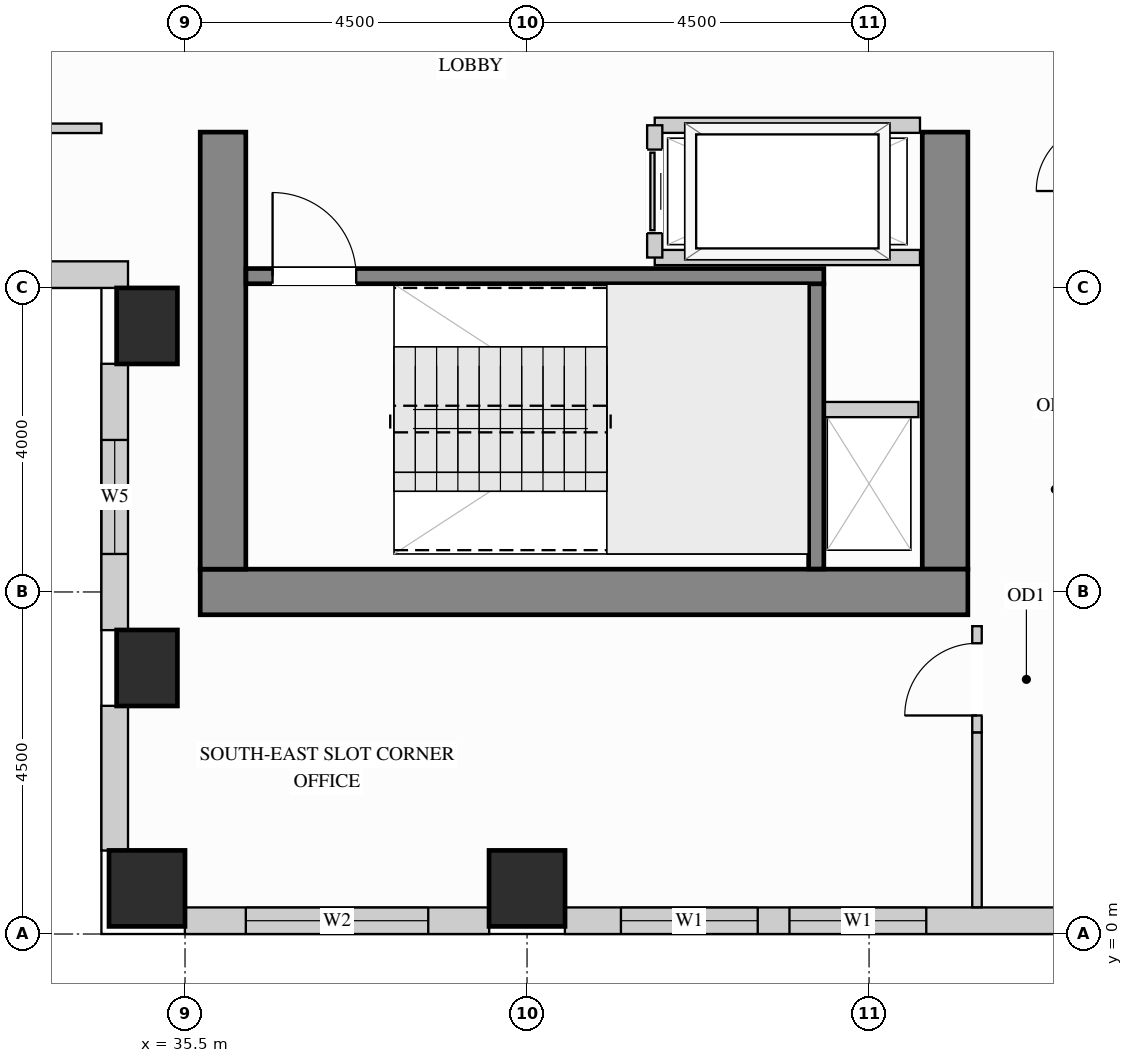
"""IFC4 building model, lengths in metres.
Left out: names, types, materials, properties, quantities, classifications, styles, units other than length and angle.
Written with IfcOpenShell. Run it as: python <this file> out.ifc"""

import sys

from ifc_helpers import new_model, si_unit, direction, frame, frame_2d, origin, origin_2d, place, context, subcontext, project, spatial, rectangle, extrude, source, transform, mapped, element, fill, save


model = new_model("IFC4")
c1 = context("Model", 3, precision=1e-05, world=origin(), true_north=direction((0.0, 1.0)))
c2 = subcontext(c1, "Body", "Model", "MODEL_VIEW")
j1 = project(units=[si_unit("LENGTHUNIT", "METRE"), si_unit("PLANEANGLEUNIT", "RADIAN")], contexts=[c1])
p1 = place(None, origin())
s1 = spatial("IfcSite", under=j1, at=p1, CompositionType="ELEMENT")
p2 = place(p1, origin())
s2 = spatial("IfcBuilding", under=s1, at=p2, CompositionType="ELEMENT")
p3 = place(p2, frame((0.0, 0.0, 168.3)))
s3 = spatial("IfcBuildingStorey", under=s2, at=p3, CompositionType="ELEMENT", Elevation=168.3)
m1 = source(origin(), c2, "Body", "SweptSolid", [
    extrude(rectangle(XDim=0.8, YDim=1.0, at=origin_2d()), origin(), (0.0, 0.0, 1.0), 3.4),
])
for number, where, z_axis, x_axis in (
    (1, (35.0, 3.5, 0.0), (0.0, 0.0, 1.0), (1.0, 0.0, 0.0)),
    (2, (35.0, 8.0, 0.0), (0.0, 0.0, 1.0), (1.0, 0.0, 0.0)),
):
    element("IfcColumn", number, at=place(p3, frame(where, z_axis=z_axis, x_axis=x_axis)), inside=s3, PredefinedType="COLUMN", context=c2, shape_type="MappedRepresentation", body=[
        mapped(m1, transform((0.0, 0.0, 0.0), x_axis=(1.0, 0.0, 0.0), y_axis=(0.0, 1.0, 0.0), z_axis=(0.0, 0.0, 1.0))),
    ])
m2 = source(origin(), c2, "Body", "SweptSolid", [
    extrude(rectangle(XDim=1.0, YDim=1.0, at=origin_2d()), origin(), (0.0, 0.0, 1.0), 3.4),
])
for number, where, z_axis, x_axis in (
    (3, (35.0, 0.6, 0.0), (0.0, 0.0, 1.0), (1.0, 0.0, 0.0)),
    (4, (40.0, 0.6, 0.0), (0.0, 0.0, 1.0), (1.0, 0.0, 0.0)),
):
    element("IfcColumn", number, at=place(p3, frame(where, z_axis=z_axis, x_axis=x_axis)), inside=s3, PredefinedType="COLUMN", context=c2, shape_type="MappedRepresentation", body=[
        mapped(m2, transform((0.0, 0.0, 0.0), x_axis=(1.0, 0.0, 0.0), y_axis=(0.0, 1.0, 0.0), z_axis=(0.0, 0.0, 1.0))),
    ])
m3 = source(origin(), c2, "Body", "SweptSolid", [
    extrude(rectangle(XDim=5.75, YDim=0.6, at=frame_2d((2.875, 0.0))), origin(), (0.0, 0.0, 1.0), 3.4),
])
p4 = place(p3, frame((45.5, 4.8, 0.0), z_axis=(0.0, 0.0, 1.0), x_axis=(0.0, 1.0, 0.0)))
e5 = element("IfcWall", 5, at=p4, inside=s3, PredefinedType="SHEAR", context=c2, shape_type="MappedRepresentation", body=[
    mapped(m3, transform((0.0, 0.0, 0.0), x_axis=(1.0, 0.0, 0.0), y_axis=(0.0, 1.0, 0.0), z_axis=(0.0, 0.0, 1.0))),
])
m4 = source(origin(), c2, "Body", "SweptSolid", [
    extrude(rectangle(XDim=10.1, YDim=0.6, at=frame_2d((5.05, 0.0))), origin(), (0.0, 0.0, 1.0), 3.4),
])
p5 = place(p3, frame((35.7, 4.5, 0.0), z_axis=(0.0, 0.0, 1.0), x_axis=(1.0, 0.0, 0.0)))
e6 = element("IfcWall", 6, at=p5, inside=s3, PredefinedType="SHEAR", context=c2, shape_type="MappedRepresentation", body=[
    mapped(m4, transform((0.0, 0.0, 0.0), x_axis=(1.0, 0.0, 0.0), y_axis=(0.0, 1.0, 0.0), z_axis=(0.0, 0.0, 1.0))),
])
p6 = place(p3, frame((36.0, 4.8, 0.0), z_axis=(0.0, 0.0, 1.0), x_axis=(0.0, 1.0, 0.0)))
e7 = element("IfcWall", 7, at=p6, inside=s3, PredefinedType="SHEAR", context=c2, shape_type="MappedRepresentation", body=[
    mapped(m3, transform((0.0, 0.0, 0.0), x_axis=(1.0, 0.0, 0.0), y_axis=(0.0, 1.0, 0.0), z_axis=(0.0, 0.0, 1.0))),
])
p7 = place(p3, frame((30.898, 8.675, 0.0), z_axis=(0.0, 0.0, 1.0), x_axis=(1.0, 0.0, 0.0)))
e8 = element("IfcWall", 8, at=p7, inside=s3, PredefinedType="SOLIDWALL", context=c2, shape_type="SweptSolid", body=[
    extrude(rectangle(XDim=3.852, YDim=0.35, at=frame_2d((1.926, 0.0))), origin(), (0.0, 0.0, 1.0), 3.385),
])
p8 = place(p7, frame((1.176, 0.0, 0.78)))
e9 = element("IfcOpeningElement", 9, at=p8, cuts=e8, PredefinedType="OPENING", context=c2, shape_type="SweptSolid", body=[
    extrude(rectangle(XDim=1.5, YDim=2.0, at=frame_2d((0.75, 1.0))), frame((0.0, 0.185, 0.0), z_axis=(0.0, -1.0, 0.0), x_axis=(1.0, 0.0, 0.0)), (0.0, 0.0, 1.0), 0.37),
])
p9 = place(p3, frame((34.575, 7.502, 0.0), z_axis=(0.0, 0.0, 1.0), x_axis=(0.0, -1.0, 0.0)))
e10 = element("IfcWall", 10, at=p9, inside=s3, PredefinedType="SOLIDWALL", context=c2, shape_type="SweptSolid", body=[
    extrude(rectangle(XDim=3.504, YDim=0.35, at=frame_2d((1.752, 0.0))), origin(), (0.0, 0.0, 1.0), 2.612),
])
p10 = place(p9, frame((1.002, 0.0, 0.78)))
e11 = element("IfcOpeningElement", 11, at=p10, cuts=e10, PredefinedType="OPENING", context=c2, shape_type="SweptSolid", body=[
    extrude(rectangle(XDim=1.5, YDim=1.652, at=frame_2d((0.75, 0.826))), frame((0.0, 0.185, 0.0), z_axis=(0.0, -1.0, 0.0), x_axis=(1.0, 0.0, 0.0)), (0.0, 0.0, 1.0), 0.37),
])
m5 = source(origin(), c2, "Body", "SweptSolid", [
    extrude(rectangle(XDim=1.904, YDim=0.35, at=frame_2d((0.952, 0.0))), origin(), (0.0, 0.0, 1.0), 2.612),
])
p11 = place(p3, frame((34.575, 3.002, 0.0), z_axis=(0.0, 0.0, 1.0), x_axis=(0.0, -1.0, 0.0)))
e12 = element("IfcWall", 12, at=p11, inside=s3, PredefinedType="SOLIDWALL", context=c2, shape_type="MappedRepresentation", body=[
    mapped(m5, transform((0.0, 0.0, 0.0), x_axis=(1.0, 0.0, 0.0), y_axis=(0.0, 1.0, 0.0), z_axis=(0.0, 0.0, 1.0))),
])
p12 = place(p3, frame((35.498, 0.175, 0.0), z_axis=(0.0, 0.0, 1.0), x_axis=(1.0, 0.0, 0.0)))
e13 = element("IfcWall", 13, at=p12, inside=s3, PredefinedType="SOLIDWALL", context=c2, shape_type="SweptSolid", body=[
    extrude(rectangle(XDim=4.004, YDim=0.35, at=frame_2d((2.002, 0.0))), origin(), (0.0, 0.0, 1.0), 2.612),
])
p13 = place(p12, frame((0.802, 0.0, 0.78)))
e14 = element("IfcOpeningElement", 14, at=p13, cuts=e13, PredefinedType="OPENING", context=c2, shape_type="SweptSolid", body=[
    extrude(rectangle(XDim=2.4, YDim=1.652, at=frame_2d((1.2, 0.826))), frame((0.0, 0.185, 0.0), z_axis=(0.0, -1.0, 0.0), x_axis=(1.0, 0.0, 0.0)), (0.0, 0.0, 1.0), 0.37),
])
p14 = place(p3, frame((40.498, 0.175, 0.0), z_axis=(0.0, 0.0, 1.0), x_axis=(1.0, 0.0, 0.0)))
e15 = element("IfcWall", 15, at=p14, inside=s3, PredefinedType="SOLIDWALL", context=c2, shape_type="SweptSolid", body=[
    extrude(rectangle(XDim=6.604, YDim=0.35, at=frame_2d((3.302, 0.0))), origin(), (0.0, 0.0, 1.0), 2.612),
])
p15 = place(p14, frame((0.737, 0.0, 0.78)))
e16 = element("IfcOpeningElement", 16, at=p15, cuts=e15, PredefinedType="OPENING", context=c2, shape_type="SweptSolid", body=[
    extrude(rectangle(XDim=1.8, YDim=1.652, at=frame_2d((0.9, 0.826))), frame((0.0, 0.185, 0.0), z_axis=(0.0, -1.0, 0.0), x_axis=(1.0, 0.0, 0.0)), (0.0, 0.0, 1.0), 0.37),
])
p16 = place(p14, frame((2.955, 0.0, 0.78)))
e17 = element("IfcOpeningElement", 17, at=p16, cuts=e15, PredefinedType="OPENING", context=c2, shape_type="SweptSolid", body=[
    extrude(rectangle(XDim=1.8, YDim=1.652, at=frame_2d((0.9, 0.826))), frame((0.0, 0.185, 0.0), z_axis=(0.0, -1.0, 0.0), x_axis=(1.0, 0.0, 0.0)), (0.0, 0.0, 1.0), 0.37),
])
p17 = place(p3, frame((45.92, 2.65, 0.0), z_axis=(0.0, 0.0, 1.0), x_axis=(0.0, 1.0, 0.0)))
e18 = element("IfcWall", 18, at=p17, inside=s3, PredefinedType="PARTITIONING", context=c2, shape_type="SweptSolid", body=[
    extrude(rectangle(XDim=1.4, YDim=0.125, at=frame_2d((0.7, 0.0))), origin(), (0.0, 0.0, 1.0), 3.385),
])
p18 = place(p17, frame((0.225, 0.0, 0.0)))
e19 = element("IfcOpeningElement", 19, at=p18, cuts=e18, PredefinedType="OPENING", context=c2, shape_type="SweptSolid", body=[
    extrude(rectangle(XDim=0.95, YDim=2.15, at=frame_2d((0.475, 1.075))), frame((0.0, 0.073, 0.0), z_axis=(0.0, -1.0, 0.0), x_axis=(1.0, 0.0, 0.0)), (0.0, 0.0, 1.0), 0.145),
])
m6 = source(origin(), c2, "Body", "SweptSolid", [
    extrude(rectangle(XDim=2.298, YDim=0.125, at=frame_2d((1.149, 0.0))), origin(), (0.0, 0.0, 1.0), 3.385),
])
p19 = place(p3, frame((45.92, 0.352, 0.0), z_axis=(0.0, 0.0, 1.0), x_axis=(0.0, 1.0, 0.0)))
e20 = element("IfcWall", 20, at=p19, inside=s3, PredefinedType="PARTITIONING", context=c2, shape_type="MappedRepresentation", body=[
    mapped(m6, transform((0.0, 0.0, 0.0), x_axis=(1.0, 0.0, 0.0), y_axis=(0.0, 1.0, 0.0), z_axis=(0.0, 0.0, 1.0))),
])
p20 = place(p3, frame((19.5, 10.6, 0.0), z_axis=(0.0, 0.0, 1.0), x_axis=(1.0, 0.0, 0.0)))
e21 = element("IfcWall", 21, at=p20, inside=s3, PredefinedType="PARTITIONING", context=c2, shape_type="SweptSolid", body=[
    extrude(rectangle(XDim=14.9, YDim=0.125, at=frame_2d((7.45, 0.0))), origin(), (0.0, 0.0, 1.0), 3.385),
])
p21 = place(p20, frame((6.975, 0.0, 0.0)))
e22 = element("IfcOpeningElement", 22, at=p21, cuts=e21, PredefinedType="OPENING", context=c2, shape_type="SweptSolid", body=[
    extrude(rectangle(XDim=0.95, YDim=2.15, at=frame_2d((0.475, 1.075))), frame((0.0, 0.073, 0.0), z_axis=(0.0, -1.0, 0.0), x_axis=(1.0, 0.0, 0.0)), (0.0, 0.0, 1.0), 0.145),
])
m7 = source(origin(), c2, "Body", "SweptSolid", [
    extrude(rectangle(XDim=1.3, YDim=0.2, at=frame_2d((0.65, 0.0))), origin(), (0.0, 0.0, 1.0), 3.385),
])
p22 = place(p3, frame((43.85, 6.9, 0.0), z_axis=(0.0, 0.0, 1.0), x_axis=(1.0, 0.0, 0.0)))
e23 = element("IfcWall", 23, at=p22, inside=s3, PredefinedType="PARTITIONING", context=c2, shape_type="MappedRepresentation", body=[
    mapped(m7, transform((0.0, 0.0, 0.0), x_axis=(1.0, 0.0, 0.0), y_axis=(0.0, 1.0, 0.0), z_axis=(0.0, 0.0, 1.0))),
])
m8 = source(origin(), c2, "Body", "SweptSolid", [
    extrude(rectangle(XDim=3.49, YDim=0.2, at=frame_2d((1.745, 0.0))), origin(), (0.0, 0.0, 1.0), 3.385),
])
for number, where, z_axis, x_axis in (
    (24, (41.68, 10.64, 0.0), (0.0, 0.0, 1.0), (1.0, 0.0, 0.0)),
    (25, (41.68, 8.9, 0.0), (0.0, 0.0, 1.0), (1.0, 0.0, 0.0)),
):
    element("IfcWall", number, at=place(p3, frame(where, z_axis=z_axis, x_axis=x_axis)), inside=s3, PredefinedType="PARTITIONING", context=c2, shape_type="MappedRepresentation", body=[
        mapped(m8, transform((0.0, 0.0, 0.0), x_axis=(1.0, 0.0, 0.0), y_axis=(0.0, 1.0, 0.0), z_axis=(0.0, 0.0, 1.0))),
    ])
p23 = place(p3, frame((41.68, 8.9, 0.0), z_axis=(0.0, 0.0, 1.0), x_axis=(0.0, 1.0, 0.0)))
e26 = element("IfcWall", 26, at=p23, inside=s3, PredefinedType="PARTITIONING", context=c2, shape_type="SweptSolid", body=[
    extrude(rectangle(XDim=1.74, YDim=0.2, at=frame_2d((0.87, 0.0))), origin(), (0.0, 0.0, 1.0), 3.385),
])
p24 = place(p23, frame((0.32, 0.0, 0.0)))
e27 = element("IfcOpeningElement", 27, at=p24, cuts=e26, PredefinedType="OPENING", context=c2, shape_type="SweptSolid", body=[
    extrude(rectangle(XDim=1.1, YDim=2.2, at=frame_2d((0.55, 1.1))), frame((0.0, 0.11, 0.0), z_axis=(0.0, -1.0, 0.0), x_axis=(1.0, 0.0, 0.0)), (0.0, 0.0, 1.0), 0.22),
])
m9 = source(origin(), c2, "Body", "SweptSolid", [
    extrude(rectangle(XDim=3.753, YDim=0.2, at=frame_2d((1.876, 0.0))), origin(), (0.0, 0.0, 1.0), 3.4),
])
p25 = place(p3, frame((43.805, 4.802, 0.0), z_axis=(0.0, 0.0, 1.0), x_axis=(0.0, 1.0, 0.0)))
e28 = element("IfcWall", 28, at=p25, inside=s3, PredefinedType="SHEAR", context=c2, shape_type="MappedRepresentation", body=[
    mapped(m9, transform((0.0, 0.0, 0.0), x_axis=(1.0, 0.0, 0.0), y_axis=(0.0, 1.0, 0.0), z_axis=(0.0, 0.0, 1.0))),
])
p26 = place(p3, frame((36.302, 8.655, 0.0), z_axis=(0.0, 0.0, 1.0), x_axis=(1.0, 0.0, 0.0)))
e29 = element("IfcWall", 29, at=p26, inside=s3, PredefinedType="SHEAR", context=c2, shape_type="SweptSolid", body=[
    extrude(rectangle(XDim=7.603, YDim=0.2, at=frame_2d((3.802, 0.0))), origin(), (0.0, 0.0, 1.0), 3.4),
])
p27 = place(p26, frame((0.35, 0.0, 0.0)))
e30 = element("IfcOpeningElement", 30, at=p27, cuts=e29, PredefinedType="OPENING", context=c2, shape_type="SweptSolid", body=[
    extrude(rectangle(XDim=1.1, YDim=2.15, at=frame_2d((0.55, 1.075))), frame((0.0, 0.11, 0.0), z_axis=(0.0, -1.0, 0.0), x_axis=(1.0, 0.0, 0.0)), (0.0, 0.0, 1.0), 0.22),
])
m10 = source(origin(), c2, "Body", "SweptSolid", [
    extrude(rectangle(XDim=1.1, YDim=2.2, at=frame_2d((0.55, 1.1))), frame((0.0, 0.025, 0.0), z_axis=(0.0, -1.0, 0.0), x_axis=(1.0, 0.0, 0.0)), (0.0, 0.0, 1.0), 0.05),
])
p28 = place(p24, origin())
e31 = element("IfcDoor", 31, at=p28, inside=s3, OperationType="SLIDING_TO_LEFT", PredefinedType="DOOR", context=c2, shape_type="MappedRepresentation", body=[
    mapped(m10, transform((0.0, 0.0, 0.0), x_axis=(1.0, 0.0, 0.0), y_axis=(0.0, 1.0, 0.0), z_axis=(0.0, 0.0, 1.0))),
])
fill(e27, e31)
m11 = source(origin(), c2, "Body", "SweptSolid", [
    extrude(rectangle(XDim=0.95, YDim=2.15, at=frame_2d((0.475, 1.075))), frame((0.0, 0.025, 0.0), z_axis=(0.0, -1.0, 0.0), x_axis=(1.0, 0.0, 0.0)), (0.0, 0.0, 1.0), 0.05),
])
p29 = place(p18, origin())
e32 = element("IfcDoor", 32, at=p29, inside=s3, OperationType="SINGLE_SWING_LEFT", PredefinedType="DOOR", context=c2, shape_type="MappedRepresentation", body=[
    mapped(m11, transform((0.0, 0.0, 0.0), x_axis=(1.0, 0.0, 0.0), y_axis=(0.0, 1.0, 0.0), z_axis=(0.0, 0.0, 1.0))),
])
fill(e19, e32)
m12 = source(origin(), c2, "Body", "SweptSolid", [
    extrude(rectangle(XDim=1.1, YDim=2.15, at=frame_2d((0.55, 1.075))), frame((0.0, 0.025, 0.0), z_axis=(0.0, -1.0, 0.0), x_axis=(1.0, 0.0, 0.0)), (0.0, 0.0, 1.0), 0.05),
])
p30 = place(p27, origin())
e33 = element("IfcDoor", 33, at=p30, inside=s3, OperationType="SINGLE_SWING_LEFT", PredefinedType="DOOR", context=c2, shape_type="MappedRepresentation", body=[
    mapped(m12, transform((0.0, 0.0, 0.0), x_axis=(1.0, 0.0, 0.0), y_axis=(0.0, 1.0, 0.0), z_axis=(0.0, 0.0, 1.0))),
])
fill(e30, e33)
m13 = source(origin(), c2, "Body", "SweptSolid", [
    extrude(rectangle(XDim=1.8, YDim=1.652, at=frame_2d((0.9, 0.826))), frame((0.0, 0.03, 0.0), z_axis=(0.0, -1.0, 0.0), x_axis=(1.0, 0.0, 0.0)), (0.0, 0.0, 1.0), 0.06),
])
p31 = place(p15, origin())
e34 = element("IfcWindow", 34, at=p31, inside=s3, PartitioningType="SINGLE_PANEL", PredefinedType="WINDOW", context=c2, shape_type="MappedRepresentation", body=[
    mapped(m13, transform((0.0, 0.0, 0.0), x_axis=(1.0, 0.0, 0.0), y_axis=(0.0, 1.0, 0.0), z_axis=(0.0, 0.0, 1.0))),
])
fill(e16, e34)
p32 = place(p16, origin())
e35 = element("IfcWindow", 35, at=p32, inside=s3, PartitioningType="SINGLE_PANEL", PredefinedType="WINDOW", context=c2, shape_type="MappedRepresentation", body=[
    mapped(m13, transform((0.0, 0.0, 0.0), x_axis=(1.0, 0.0, 0.0), y_axis=(0.0, 1.0, 0.0), z_axis=(0.0, 0.0, 1.0))),
])
fill(e17, e35)
m14 = source(origin(), c2, "Body", "SweptSolid", [
    extrude(rectangle(XDim=2.4, YDim=1.652, at=frame_2d((1.2, 0.826))), frame((0.0, 0.03, 0.0), z_axis=(0.0, -1.0, 0.0), x_axis=(1.0, 0.0, 0.0)), (0.0, 0.0, 1.0), 0.06),
])
p33 = place(p13, origin())
e36 = element("IfcWindow", 36, at=p33, inside=s3, PartitioningType="SINGLE_PANEL", PredefinedType="WINDOW", context=c2, shape_type="MappedRepresentation", body=[
    mapped(m14, transform((0.0, 0.0, 0.0), x_axis=(1.0, 0.0, 0.0), y_axis=(0.0, 1.0, 0.0), z_axis=(0.0, 0.0, 1.0))),
])
fill(e14, e36)
m15 = source(origin(), c2, "Body", "SweptSolid", [
    extrude(rectangle(XDim=1.5, YDim=1.652, at=frame_2d((0.75, 0.826))), frame((0.0, 0.03, 0.0), z_axis=(0.0, -1.0, 0.0), x_axis=(1.0, 0.0, 0.0)), (0.0, 0.0, 1.0), 0.06),
])
p34 = place(p10, origin())
e37 = element("IfcWindow", 37, at=p34, inside=s3, PartitioningType="SINGLE_PANEL", PredefinedType="WINDOW", context=c2, shape_type="MappedRepresentation", body=[
    mapped(m15, transform((0.0, 0.0, 0.0), x_axis=(1.0, 0.0, 0.0), y_axis=(0.0, 1.0, 0.0), z_axis=(0.0, 0.0, 1.0))),
])
fill(e11, e37)
save(model, sys.argv[1])
